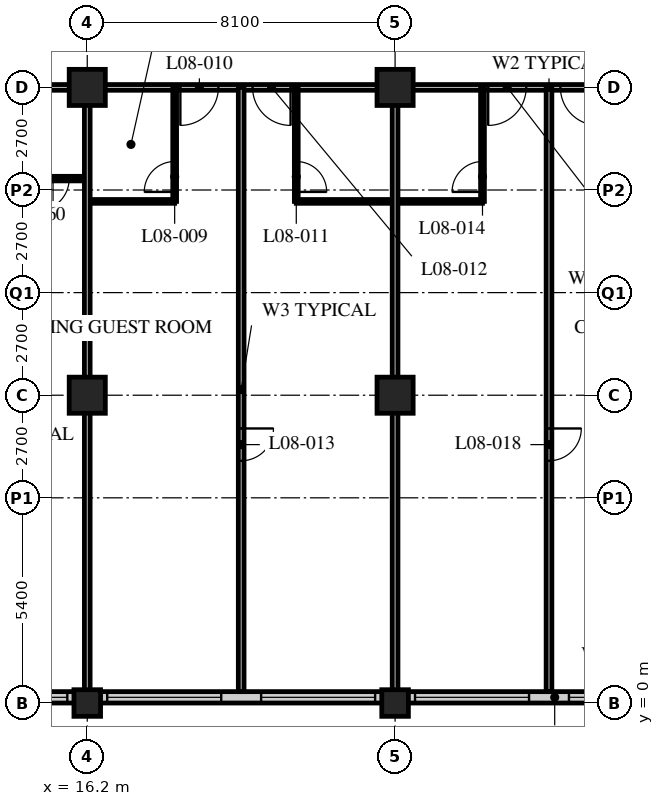
"""IFC4 building model, lengths in metres.
Left out: names, types, materials, properties, quantities, classifications, styles, units other than length and angle.
Written with IfcOpenShell. Run it as: python <this file> out.ifc"""

import sys

from ifc_helpers import new_model, si_unit, direction, frame, frame_2d, origin, origin_2d, place, context, subcontext, project, spatial, rectangle, hollow_rectangle, extrude, element, fill, save


model = new_model("IFC4")
c1 = context("Model", 3, precision=1e-05, world=origin(), true_north=direction((0.0, 1.0)))
c2 = subcontext(c1, "Body", "Model", "MODEL_VIEW")
j1 = project(units=[si_unit("LENGTHUNIT", "METRE"), si_unit("PLANEANGLEUNIT", "RADIAN")], contexts=[c1])
p1 = place(None, origin())
s1 = spatial("IfcSite", under=j1, at=p1, CompositionType="ELEMENT")
p2 = place(p1, origin())
s2 = spatial("IfcBuilding", under=s1, at=p2, CompositionType="ELEMENT")
p3 = place(p2, frame((0.0, 0.0, 39.8)))
s3 = spatial("IfcBuildingStorey", under=s2, at=p3, CompositionType="ELEMENT", Elevation=39.8)
p4 = place(p3, frame((16.2, 0.0, 0.0), z_axis=(0.0, 0.0, 1.0), x_axis=(1.0, 0.0, 0.0)))
e1 = element("IfcColumn", 1, at=p4, inside=s3, PredefinedType="COLUMN", context=c2, shape_type="SweptSolid", body=[
    extrude(hollow_rectangle(XDim=0.7, YDim=0.7, WallThickness=0.06, at=origin_2d()), origin(), (0.0, 0.0, 1.0), 3.4),
])
for number, where, z_axis, x_axis in (
    (2, (16.2, 8.1, 0.0), (0.0, 0.0, 1.0), (1.0, 0.0, 0.0)),
    (3, (16.2, 16.2, 0.0), (0.0, 0.0, 1.0), (1.0, 0.0, 0.0)),
):
    element("IfcColumn", number, at=place(p3, frame(where, z_axis=z_axis, x_axis=x_axis)), inside=s3, PredefinedType="COLUMN", context=c2, shape_type="SweptSolid", body=[
        extrude(hollow_rectangle(XDim=0.95, YDim=0.95, WallThickness=0.095, at=origin_2d()), origin(), (0.0, 0.0, 1.0), 3.4),
    ])
p5 = place(p3, frame((24.3, 0.0, 0.0), z_axis=(0.0, 0.0, 1.0), x_axis=(1.0, 0.0, 0.0)))
e4 = element("IfcColumn", 4, at=p5, inside=s3, PredefinedType="COLUMN", context=c2, shape_type="SweptSolid", body=[
    extrude(hollow_rectangle(XDim=0.7, YDim=0.7, WallThickness=0.06, at=origin_2d()), origin(), (0.0, 0.0, 1.0), 3.4),
])
for number, where, z_axis, x_axis in (
    (5, (24.3, 8.1, 0.0), (0.0, 0.0, 1.0), (1.0, 0.0, 0.0)),
    (6, (24.3, 16.2, 0.0), (0.0, 0.0, 1.0), (1.0, 0.0, 0.0)),
):
    element("IfcColumn", number, at=place(p3, frame(where, z_axis=z_axis, x_axis=x_axis)), inside=s3, PredefinedType="COLUMN", context=c2, shape_type="SweptSolid", body=[
        extrude(hollow_rectangle(XDim=0.95, YDim=0.95, WallThickness=0.095, at=origin_2d()), origin(), (0.0, 0.0, 1.0), 3.4),
    ])
p6 = place(p3, frame((8.4, 0.15, 0.0), z_axis=(0.0, 0.0, 1.0), x_axis=(1.0, 0.0, 0.0)))
e7 = element("IfcWall", 7, at=p6, inside=s3, PredefinedType="SOLIDWALL", context=c2, shape_type="SweptSolid", body=[
    extrude(rectangle(XDim=40.2, YDim=0.3, at=frame_2d((20.1, 0.0))), origin(), (0.0, 0.0, 1.0), 3.19),
])
p7 = place(p6, frame((0.225, 0.0, 0.9)))
e8 = element("IfcOpeningElement", 8, at=p7, cuts=e7, PredefinedType="OPENING", context=c2, shape_type="SweptSolid", body=[
    extrude(rectangle(XDim=3.0, YDim=2.0, at=frame_2d((1.5, 1.0))), frame((0.0, 0.16, 0.0), z_axis=(0.0, -1.0, 0.0), x_axis=(1.0, 0.0, 0.0)), (0.0, 0.0, 1.0), 0.32),
])
p8 = place(p6, frame((4.275, 0.0, 0.9)))
e9 = element("IfcOpeningElement", 9, at=p8, cuts=e7, PredefinedType="OPENING", context=c2, shape_type="SweptSolid", body=[
    extrude(rectangle(XDim=3.0, YDim=2.0, at=frame_2d((1.5, 1.0))), frame((0.0, 0.16, 0.0), z_axis=(0.0, -1.0, 0.0), x_axis=(1.0, 0.0, 0.0)), (0.0, 0.0, 1.0), 0.32),
])
p9 = place(p6, frame((8.325, 0.0, 0.9)))
e10 = element("IfcOpeningElement", 10, at=p9, cuts=e7, PredefinedType="OPENING", context=c2, shape_type="SweptSolid", body=[
    extrude(rectangle(XDim=3.0, YDim=2.0, at=frame_2d((1.5, 1.0))), frame((0.0, 0.16, 0.0), z_axis=(0.0, -1.0, 0.0), x_axis=(1.0, 0.0, 0.0)), (0.0, 0.0, 1.0), 0.32),
])
p10 = place(p6, frame((12.375, 0.0, 0.9)))
e11 = element("IfcOpeningElement", 11, at=p10, cuts=e7, PredefinedType="OPENING", context=c2, shape_type="SweptSolid", body=[
    extrude(rectangle(XDim=3.0, YDim=2.0, at=frame_2d((1.5, 1.0))), frame((0.0, 0.16, 0.0), z_axis=(0.0, -1.0, 0.0), x_axis=(1.0, 0.0, 0.0)), (0.0, 0.0, 1.0), 0.32),
])
p11 = place(p6, frame((16.425, 0.0, 0.9)))
e12 = element("IfcOpeningElement", 12, at=p11, cuts=e7, PredefinedType="OPENING", context=c2, shape_type="SweptSolid", body=[
    extrude(rectangle(XDim=3.0, YDim=2.0, at=frame_2d((1.5, 1.0))), frame((0.0, 0.16, 0.0), z_axis=(0.0, -1.0, 0.0), x_axis=(1.0, 0.0, 0.0)), (0.0, 0.0, 1.0), 0.32),
])
p12 = place(p6, frame((20.475, 0.0, 0.9)))
e13 = element("IfcOpeningElement", 13, at=p12, cuts=e7, PredefinedType="OPENING", context=c2, shape_type="SweptSolid", body=[
    extrude(rectangle(XDim=3.0, YDim=2.0, at=frame_2d((1.5, 1.0))), frame((0.0, 0.16, 0.0), z_axis=(0.0, -1.0, 0.0), x_axis=(1.0, 0.0, 0.0)), (0.0, 0.0, 1.0), 0.32),
])
p13 = place(p6, frame((24.525, 0.0, 0.9)))
e14 = element("IfcOpeningElement", 14, at=p13, cuts=e7, PredefinedType="OPENING", context=c2, shape_type="SweptSolid", body=[
    extrude(rectangle(XDim=3.0, YDim=2.0, at=frame_2d((1.5, 1.0))), frame((0.0, 0.16, 0.0), z_axis=(0.0, -1.0, 0.0), x_axis=(1.0, 0.0, 0.0)), (0.0, 0.0, 1.0), 0.32),
])
p14 = place(p6, frame((28.575, 0.0, 0.9)))
e15 = element("IfcOpeningElement", 15, at=p14, cuts=e7, PredefinedType="OPENING", context=c2, shape_type="SweptSolid", body=[
    extrude(rectangle(XDim=3.0, YDim=2.0, at=frame_2d((1.5, 1.0))), frame((0.0, 0.16, 0.0), z_axis=(0.0, -1.0, 0.0), x_axis=(1.0, 0.0, 0.0)), (0.0, 0.0, 1.0), 0.32),
])
p15 = place(p6, frame((32.625, 0.0, 0.9)))
e16 = element("IfcOpeningElement", 16, at=p15, cuts=e7, PredefinedType="OPENING", context=c2, shape_type="SweptSolid", body=[
    extrude(rectangle(XDim=3.0, YDim=2.0, at=frame_2d((1.5, 1.0))), frame((0.0, 0.16, 0.0), z_axis=(0.0, -1.0, 0.0), x_axis=(1.0, 0.0, 0.0)), (0.0, 0.0, 1.0), 0.32),
])
p16 = place(p6, frame((36.675, 0.0, 0.9)))
e17 = element("IfcOpeningElement", 17, at=p16, cuts=e7, PredefinedType="OPENING", context=c2, shape_type="SweptSolid", body=[
    extrude(rectangle(XDim=3.0, YDim=2.0, at=frame_2d((1.5, 1.0))), frame((0.0, 0.16, 0.0), z_axis=(0.0, -1.0, 0.0), x_axis=(1.0, 0.0, 0.0)), (0.0, 0.0, 1.0), 0.32),
])
p17 = place(p3, frame((12.15, 16.2, 0.0), z_axis=(0.0, 0.0, 1.0), x_axis=(1.0, 0.0, 0.0)))
e18 = element("IfcWall", 18, at=p17, inside=s3, PredefinedType="PARTITIONING", context=c2, shape_type="SweptSolid", body=[
    extrude(rectangle(XDim=32.4, YDim=0.15, at=frame_2d((16.2, 0.0))), origin(), (0.0, 0.0, 1.0), 2.578),
])
p18 = place(p17, frame((6.5, 0.0, 0.0)))
e19 = element("IfcOpeningElement", 19, at=p18, cuts=e18, PredefinedType="OPENING", context=c2, shape_type="SweptSolid", body=[
    extrude(rectangle(XDim=1.0, YDim=2.1, at=frame_2d((0.5, 1.05))), frame((0.0, 0.085, 0.0), z_axis=(0.0, -1.0, 0.0), x_axis=(1.0, 0.0, 0.0)), (0.0, 0.0, 1.0), 0.17),
])
p19 = place(p17, frame((8.4, 0.0, 0.0)))
e20 = element("IfcOpeningElement", 20, at=p19, cuts=e18, PredefinedType="OPENING", context=c2, shape_type="SweptSolid", body=[
    extrude(rectangle(XDim=1.0, YDim=2.1, at=frame_2d((0.5, 1.05))), frame((0.0, 0.085, 0.0), z_axis=(0.0, -1.0, 0.0), x_axis=(1.0, 0.0, 0.0)), (0.0, 0.0, 1.0), 0.17),
])
p20 = place(p17, frame((14.6, 0.0, 0.0)))
e21 = element("IfcOpeningElement", 21, at=p20, cuts=e18, PredefinedType="OPENING", context=c2, shape_type="SweptSolid", body=[
    extrude(rectangle(XDim=1.0, YDim=2.1, at=frame_2d((0.5, 1.05))), frame((0.0, 0.085, 0.0), z_axis=(0.0, -1.0, 0.0), x_axis=(1.0, 0.0, 0.0)), (0.0, 0.0, 1.0), 0.17),
])
p21 = place(p17, frame((16.5, 0.0, 0.0)))
e22 = element("IfcOpeningElement", 22, at=p21, cuts=e18, PredefinedType="OPENING", context=c2, shape_type="SweptSolid", body=[
    extrude(rectangle(XDim=1.0, YDim=2.1, at=frame_2d((0.5, 1.05))), frame((0.0, 0.085, 0.0), z_axis=(0.0, -1.0, 0.0), x_axis=(1.0, 0.0, 0.0)), (0.0, 0.0, 1.0), 0.17),
])
p22 = place(p17, frame((23.0, 0.0, 0.0)))
e23 = element("IfcOpeningElement", 23, at=p22, cuts=e18, PredefinedType="OPENING", context=c2, shape_type="SweptSolid", body=[
    extrude(rectangle(XDim=1.0, YDim=2.1, at=frame_2d((0.5, 1.05))), frame((0.0, 0.085, 0.0), z_axis=(0.0, -1.0, 0.0), x_axis=(1.0, 0.0, 0.0)), (0.0, 0.0, 1.0), 0.17),
])
p23 = place(p17, frame((24.6, 0.0, 0.0)))
e24 = element("IfcOpeningElement", 24, at=p23, cuts=e18, PredefinedType="OPENING", context=c2, shape_type="SweptSolid", body=[
    extrude(rectangle(XDim=1.0, YDim=2.1, at=frame_2d((0.5, 1.05))), frame((0.0, 0.085, 0.0), z_axis=(0.0, -1.0, 0.0), x_axis=(1.0, 0.0, 0.0)), (0.0, 0.0, 1.0), 0.17),
])
p24 = place(p17, frame((1.525, 0.0, 0.0)))
e25 = element("IfcOpeningElement", 25, at=p24, cuts=e18, PredefinedType="OPENING", context=c2, shape_type="SweptSolid", body=[
    extrude(rectangle(XDim=1.0, YDim=2.1, at=frame_2d((0.5, 1.05))), frame((0.0, 0.085, 0.0), z_axis=(0.0, -1.0, 0.0), x_axis=(1.0, 0.0, 0.0)), (0.0, 0.0, 1.0), 0.17),
])
p25 = place(p17, frame((29.875, 0.0, 0.0)))
e26 = element("IfcOpeningElement", 26, at=p25, cuts=e18, PredefinedType="OPENING", context=c2, shape_type="SweptSolid", body=[
    extrude(rectangle(XDim=1.0, YDim=2.1, at=frame_2d((0.5, 1.05))), frame((0.0, 0.085, 0.0), z_axis=(0.0, -1.0, 0.0), x_axis=(1.0, 0.0, 0.0)), (0.0, 0.0, 1.0), 0.17),
])
p26 = place(p3, frame((16.2, 13.2, 0.0), z_axis=(0.0, 0.0, 1.0), x_axis=(1.0, 0.0, 0.0)))
e27 = element("IfcWall", 27, at=p26, inside=s3, PredefinedType="PARTITIONING", context=c2, shape_type="SweptSolid", body=[
    extrude(rectangle(XDim=2.3, YDim=0.1, at=frame_2d((1.15, 0.0))), origin(), (0.0, 0.0, 1.0), 3.19),
])
p27 = place(p3, frame((18.5, 16.2, 0.0), z_axis=(0.0, 0.0, 1.0), x_axis=(0.0, -1.0, 0.0)))
e28 = element("IfcWall", 28, at=p27, inside=s3, PredefinedType="PARTITIONING", context=c2, shape_type="SweptSolid", body=[
    extrude(rectangle(XDim=3.0, YDim=0.1, at=frame_2d((1.5, 0.0))), origin(), (0.0, 0.0, 1.0), 3.19),
])
p28 = place(p27, frame((1.95, 0.0, 0.0)))
e29 = element("IfcOpeningElement", 29, at=p28, cuts=e28, PredefinedType="OPENING", context=c2, shape_type="SweptSolid", body=[
    extrude(rectangle(XDim=0.8, YDim=2.1, at=frame_2d((0.4, 1.05))), frame((0.0, 0.06, 0.0), z_axis=(0.0, -1.0, 0.0), x_axis=(1.0, 0.0, 0.0)), (0.0, 0.0, 1.0), 0.12),
])
p29 = place(p3, frame((21.7, 13.2, 0.0), z_axis=(0.0, 0.0, 1.0), x_axis=(1.0, 0.0, 0.0)))
e30 = element("IfcWall", 30, at=p29, inside=s3, PredefinedType="PARTITIONING", context=c2, shape_type="SweptSolid", body=[
    extrude(rectangle(XDim=4.9, YDim=0.1, at=frame_2d((2.45, 0.0))), origin(), (0.0, 0.0, 1.0), 3.19),
])
p30 = place(p3, frame((21.7, 16.2, 0.0), z_axis=(0.0, 0.0, 1.0), x_axis=(0.0, -1.0, 0.0)))
e31 = element("IfcWall", 31, at=p30, inside=s3, PredefinedType="PARTITIONING", context=c2, shape_type="SweptSolid", body=[
    extrude(rectangle(XDim=3.0, YDim=0.1, at=frame_2d((1.5, 0.0))), origin(), (0.0, 0.0, 1.0), 3.19),
])
p31 = place(p30, frame((1.95, 0.0, 0.0)))
e32 = element("IfcOpeningElement", 32, at=p31, cuts=e31, PredefinedType="OPENING", context=c2, shape_type="SweptSolid", body=[
    extrude(rectangle(XDim=0.8, YDim=2.1, at=frame_2d((0.4, 1.05))), frame((0.0, 0.06, 0.0), z_axis=(0.0, -1.0, 0.0), x_axis=(1.0, 0.0, 0.0)), (0.0, 0.0, 1.0), 0.12),
])
p32 = place(p3, frame((20.25, 16.2, 0.0), z_axis=(0.0, 0.0, 1.0), x_axis=(0.0, -1.0, 0.0)))
e33 = element("IfcWall", 33, at=p32, inside=s3, PredefinedType="PARTITIONING", context=c2, shape_type="SweptSolid", body=[
    extrude(rectangle(XDim=15.9, YDim=0.15, at=frame_2d((7.95, 0.0))), origin(), (0.0, 0.0, 1.0), 3.19),
])
p33 = place(p32, frame((8.975, 0.0, 0.0)))
e34 = element("IfcOpeningElement", 34, at=p33, cuts=e33, PredefinedType="OPENING", context=c2, shape_type="SweptSolid", body=[
    extrude(rectangle(XDim=0.85, YDim=2.1, at=frame_2d((0.425, 1.05))), frame((0.0, 0.085, 0.0), z_axis=(0.0, -1.0, 0.0), x_axis=(1.0, 0.0, 0.0)), (0.0, 0.0, 1.0), 0.17),
])
p34 = place(p3, frame((24.3, 16.2, 0.0), z_axis=(0.0, 0.0, 1.0), x_axis=(0.0, -1.0, 0.0)))
e35 = element("IfcWall", 35, at=p34, inside=s3, PredefinedType="PARTITIONING", context=c2, shape_type="SweptSolid", body=[
    extrude(rectangle(XDim=15.9, YDim=0.15, at=frame_2d((7.95, 0.0))), origin(), (0.0, 0.0, 1.0), 2.578),
])
p35 = place(p3, frame((26.6, 16.2, 0.0), z_axis=(0.0, 0.0, 1.0), x_axis=(0.0, -1.0, 0.0)))
e36 = element("IfcWall", 36, at=p35, inside=s3, PredefinedType="PARTITIONING", context=c2, shape_type="SweptSolid", body=[
    extrude(rectangle(XDim=3.0, YDim=0.1, at=frame_2d((1.5, 0.0))), origin(), (0.0, 0.0, 1.0), 3.19),
])
p36 = place(p35, frame((1.95, 0.0, 0.0)))
e37 = element("IfcOpeningElement", 37, at=p36, cuts=e36, PredefinedType="OPENING", context=c2, shape_type="SweptSolid", body=[
    extrude(rectangle(XDim=0.8, YDim=2.1, at=frame_2d((0.4, 1.05))), frame((0.0, 0.06, 0.0), z_axis=(0.0, -1.0, 0.0), x_axis=(1.0, 0.0, 0.0)), (0.0, 0.0, 1.0), 0.12),
])
p37 = place(p3, frame((28.35, 16.2, 0.0), z_axis=(0.0, 0.0, 1.0), x_axis=(0.0, -1.0, 0.0)))
e38 = element("IfcWall", 38, at=p37, inside=s3, PredefinedType="PARTITIONING", context=c2, shape_type="SweptSolid", body=[
    extrude(rectangle(XDim=15.9, YDim=0.15, at=frame_2d((7.95, 0.0))), origin(), (0.0, 0.0, 1.0), 3.19),
])
p38 = place(p37, frame((8.975, 0.0, 0.0)))
e39 = element("IfcOpeningElement", 39, at=p38, cuts=e38, PredefinedType="OPENING", context=c2, shape_type="SweptSolid", body=[
    extrude(rectangle(XDim=0.85, YDim=2.1, at=frame_2d((0.425, 1.05))), frame((0.0, 0.085, 0.0), z_axis=(0.0, -1.0, 0.0), x_axis=(1.0, 0.0, 0.0)), (0.0, 0.0, 1.0), 0.17),
])
p39 = place(p3, frame((8.15, 13.8, 0.0), z_axis=(0.0, 0.0, 1.0), x_axis=(1.0, 0.0, 0.0)))
e40 = element("IfcWall", 40, at=p39, inside=s3, PredefinedType="PARTITIONING", context=c2, shape_type="SweptSolid", body=[
    extrude(rectangle(XDim=8.05, YDim=0.12, at=frame_2d((4.025, 0.0))), origin(), (0.0, 0.0, 1.0), 3.19),
])
p40 = place(p39, frame((6.725, 0.0, 0.0)))
e41 = element("IfcOpeningElement", 41, at=p40, cuts=e40, PredefinedType="OPENING", context=c2, shape_type="SweptSolid", body=[
    extrude(rectangle(XDim=0.85, YDim=2.1, at=frame_2d((0.425, 1.05))), frame((0.0, 0.07, 0.0), z_axis=(0.0, -1.0, 0.0), x_axis=(1.0, 0.0, 0.0)), (0.0, 0.0, 1.0), 0.14),
])
p41 = place(p39, frame((2.875, 0.0, 0.0)))
e42 = element("IfcOpeningElement", 42, at=p41, cuts=e40, PredefinedType="OPENING", context=c2, shape_type="SweptSolid", body=[
    extrude(rectangle(XDim=0.85, YDim=2.1, at=frame_2d((0.425, 1.05))), frame((0.0, 0.07, 0.0), z_axis=(0.0, -1.0, 0.0), x_axis=(1.0, 0.0, 0.0)), (0.0, 0.0, 1.0), 0.14),
])
p42 = place(p3, frame((16.2, 16.2, 0.0), z_axis=(0.0, 0.0, 1.0), x_axis=(0.0, -1.0, 0.0)))
e43 = element("IfcWall", 43, at=p42, inside=s3, PredefinedType="PARTITIONING", context=c2, shape_type="SweptSolid", body=[
    extrude(rectangle(XDim=15.9, YDim=0.15, at=frame_2d((7.95, 0.0))), origin(), (0.0, 0.0, 1.0), 2.578),
])
p43 = place(p8, origin())
e44 = element("IfcWindow", 44, at=p43, inside=s3, PartitioningType="SINGLE_PANEL", PredefinedType="WINDOW", context=c2, shape_type="SweptSolid", body=[
    extrude(rectangle(XDim=3.0, YDim=2.0, at=frame_2d((1.5, 1.0))), frame((0.0, 0.03, 0.0), z_axis=(0.0, -1.0, 0.0), x_axis=(1.0, 0.0, 0.0)), (0.0, 0.0, 1.0), 0.06),
])
fill(e9, e44)
p44 = place(p9, origin())
e45 = element("IfcWindow", 45, at=p44, inside=s3, PartitioningType="SINGLE_PANEL", PredefinedType="WINDOW", context=c2, shape_type="SweptSolid", body=[
    extrude(rectangle(XDim=3.0, YDim=2.0, at=frame_2d((1.5, 1.0))), frame((0.0, 0.03, 0.0), z_axis=(0.0, -1.0, 0.0), x_axis=(1.0, 0.0, 0.0)), (0.0, 0.0, 1.0), 0.06),
])
fill(e10, e45)
p45 = place(p10, origin())
e46 = element("IfcWindow", 46, at=p45, inside=s3, PartitioningType="SINGLE_PANEL", PredefinedType="WINDOW", context=c2, shape_type="SweptSolid", body=[
    extrude(rectangle(XDim=3.0, YDim=2.0, at=frame_2d((1.5, 1.0))), frame((0.0, 0.03, 0.0), z_axis=(0.0, -1.0, 0.0), x_axis=(1.0, 0.0, 0.0)), (0.0, 0.0, 1.0), 0.06),
])
fill(e11, e46)
p46 = place(p11, origin())
e47 = element("IfcWindow", 47, at=p46, inside=s3, PartitioningType="SINGLE_PANEL", PredefinedType="WINDOW", context=c2, shape_type="SweptSolid", body=[
    extrude(rectangle(XDim=3.0, YDim=2.0, at=frame_2d((1.5, 1.0))), frame((0.0, 0.03, 0.0), z_axis=(0.0, -1.0, 0.0), x_axis=(1.0, 0.0, 0.0)), (0.0, 0.0, 1.0), 0.06),
])
fill(e12, e47)
p47 = place(p12, origin())
e48 = element("IfcWindow", 48, at=p47, inside=s3, PartitioningType="SINGLE_PANEL", PredefinedType="WINDOW", context=c2, shape_type="SweptSolid", body=[
    extrude(rectangle(XDim=3.0, YDim=2.0, at=frame_2d((1.5, 1.0))), frame((0.0, 0.03, 0.0), z_axis=(0.0, -1.0, 0.0), x_axis=(1.0, 0.0, 0.0)), (0.0, 0.0, 1.0), 0.06),
])
fill(e13, e48)
p48 = place(p28, origin())
e49 = element("IfcDoor", 49, at=p48, inside=s3, OperationType="SINGLE_SWING_LEFT", PredefinedType="DOOR", context=c2, shape_type="SweptSolid", body=[
    extrude(rectangle(XDim=0.8, YDim=2.1, at=frame_2d((0.4, 1.05))), frame((0.0, 0.025, 0.0), z_axis=(0.0, -1.0, 0.0), x_axis=(1.0, 0.0, 0.0)), (0.0, 0.0, 1.0), 0.05),
])
fill(e29, e49)
p49 = place(p18, origin())
e50 = element("IfcDoor", 50, at=p49, inside=s3, OperationType="SINGLE_SWING_RIGHT", PredefinedType="DOOR", context=c2, shape_type="SweptSolid", body=[
    extrude(rectangle(XDim=1.0, YDim=2.1, at=frame_2d((0.5, 1.05))), frame((0.0, 0.025, 0.0), z_axis=(0.0, -1.0, 0.0), x_axis=(1.0, 0.0, 0.0)), (0.0, 0.0, 1.0), 0.05),
])
fill(e19, e50)
p50 = place(p31, origin())
e51 = element("IfcDoor", 51, at=p50, inside=s3, OperationType="SINGLE_SWING_RIGHT", PredefinedType="DOOR", context=c2, shape_type="SweptSolid", body=[
    extrude(rectangle(XDim=0.8, YDim=2.1, at=frame_2d((0.4, 1.05))), frame((0.0, 0.025, 0.0), z_axis=(0.0, -1.0, 0.0), x_axis=(1.0, 0.0, 0.0)), (0.0, 0.0, 1.0), 0.05),
])
fill(e32, e51)
p51 = place(p19, origin())
e52 = element("IfcDoor", 52, at=p51, inside=s3, OperationType="SINGLE_SWING_LEFT", PredefinedType="DOOR", context=c2, shape_type="SweptSolid", body=[
    extrude(rectangle(XDim=1.0, YDim=2.1, at=frame_2d((0.5, 1.05))), frame((0.0, 0.025, 0.0), z_axis=(0.0, -1.0, 0.0), x_axis=(1.0, 0.0, 0.0)), (0.0, 0.0, 1.0), 0.05),
])
fill(e20, e52)
p52 = place(p33, origin())
e53 = element("IfcDoor", 53, at=p52, inside=s3, OperationType="SINGLE_SWING_LEFT", PredefinedType="DOOR", context=c2, shape_type="SweptSolid", body=[
    extrude(rectangle(XDim=0.85, YDim=2.1, at=frame_2d((0.425, 1.05))), frame((0.0, 0.025, 0.0), z_axis=(0.0, -1.0, 0.0), x_axis=(1.0, 0.0, 0.0)), (0.0, 0.0, 1.0), 0.05),
])
fill(e34, e53)
p53 = place(p36, origin())
e54 = element("IfcDoor", 54, at=p53, inside=s3, OperationType="SINGLE_SWING_LEFT", PredefinedType="DOOR", context=c2, shape_type="SweptSolid", body=[
    extrude(rectangle(XDim=0.8, YDim=2.1, at=frame_2d((0.4, 1.05))), frame((0.0, 0.025, 0.0), z_axis=(0.0, -1.0, 0.0), x_axis=(1.0, 0.0, 0.0)), (0.0, 0.0, 1.0), 0.05),
])
fill(e37, e54)
p54 = place(p20, origin())
e55 = element("IfcDoor", 55, at=p54, inside=s3, OperationType="SINGLE_SWING_RIGHT", PredefinedType="DOOR", context=c2, shape_type="SweptSolid", body=[
    extrude(rectangle(XDim=1.0, YDim=2.1, at=frame_2d((0.5, 1.05))), frame((0.0, 0.025, 0.0), z_axis=(0.0, -1.0, 0.0), x_axis=(1.0, 0.0, 0.0)), (0.0, 0.0, 1.0), 0.05),
])
fill(e21, e55)
p55 = place(p21, origin())
e56 = element("IfcDoor", 56, at=p55, inside=s3, OperationType="SINGLE_SWING_LEFT", PredefinedType="DOOR", context=c2, shape_type="SweptSolid", body=[
    extrude(rectangle(XDim=1.0, YDim=2.1, at=frame_2d((0.5, 1.05))), frame((0.0, 0.025, 0.0), z_axis=(0.0, -1.0, 0.0), x_axis=(1.0, 0.0, 0.0)), (0.0, 0.0, 1.0), 0.05),
])
fill(e22, e56)
p56 = place(p38, origin())
e57 = element("IfcDoor", 57, at=p56, inside=s3, OperationType="SINGLE_SWING_LEFT", PredefinedType="DOOR", context=c2, shape_type="SweptSolid", body=[
    extrude(rectangle(XDim=0.85, YDim=2.1, at=frame_2d((0.425, 1.05))), frame((0.0, 0.025, 0.0), z_axis=(0.0, -1.0, 0.0), x_axis=(1.0, 0.0, 0.0)), (0.0, 0.0, 1.0), 0.05),
])
fill(e39, e57)
p57 = place(p40, origin())
e58 = element("IfcDoor", 58, at=p57, inside=s3, OperationType="SINGLE_SWING_RIGHT", PredefinedType="DOOR", context=c2, shape_type="SweptSolid", body=[
    extrude(rectangle(XDim=0.85, YDim=2.1, at=frame_2d((0.425, 1.05))), frame((0.0, 0.025, 0.0), z_axis=(0.0, -1.0, 0.0), x_axis=(1.0, 0.0, 0.0)), (0.0, 0.0, 1.0), 0.05),
])
fill(e41, e58)
save(model, sys.argv[1])
